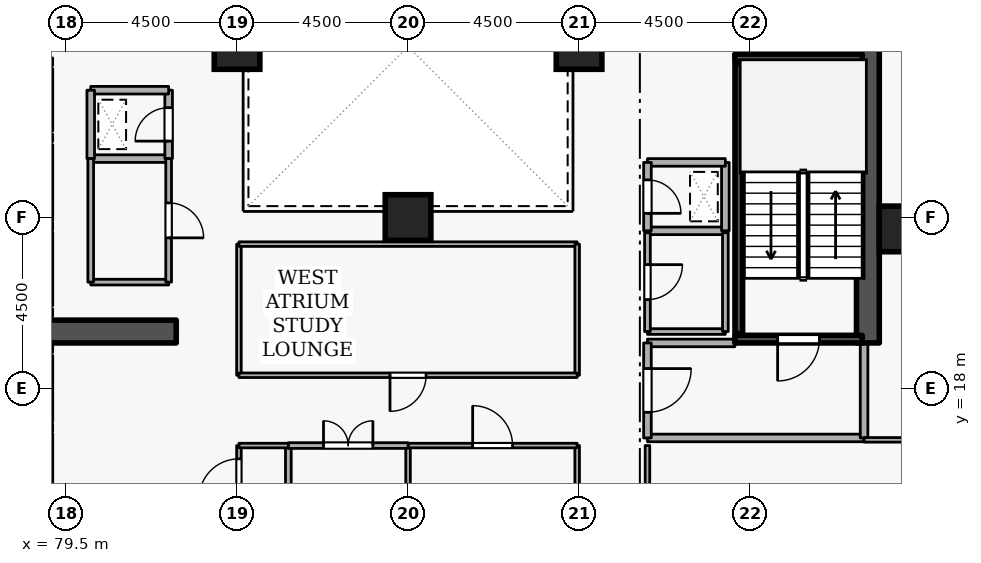
"""IFC4 building model, lengths in metres.
Left out: names, types, materials, properties, quantities, classifications, styles, units other than length and angle.
Written with IfcOpenShell. Run it as: python <this file> out.ifc"""

import sys

from ifc_helpers import new_model, si_unit, direction, frame, frame_2d, origin, origin_2d, place, context, subcontext, project, spatial, rectangle, extrude, element, fill, save


model = new_model("IFC4")
c1 = context("Model", 3, precision=1e-05, world=origin(), true_north=direction((0.0, 1.0)))
c2 = subcontext(c1, "Body", "Model", "MODEL_VIEW")
j1 = project(units=[si_unit("LENGTHUNIT", "METRE"), si_unit("PLANEANGLEUNIT", "RADIAN")], contexts=[c1])
p1 = place(None, origin())
s1 = spatial("IfcSite", under=j1, at=p1, CompositionType="ELEMENT")
p2 = place(p1, origin())
s2 = spatial("IfcBuilding", under=s1, at=p2, CompositionType="ELEMENT")
p3 = place(p2, frame((0.0, 0.0, 108.9)))
s3 = spatial("IfcBuildingStorey", under=s2, at=p3, CompositionType="ELEMENT", Elevation=108.9)
p4 = place(p3, frame((100.6, 19.2, 0.0), z_axis=(0.0, 0.0, 1.0), x_axis=(0.0, 1.0, 0.0)))
e1 = element("IfcWall", 1, at=p4, inside=s3, PredefinedType="SHEAR", context=c2, shape_type="SweptSolid", body=[
    extrude(rectangle(XDim=15.6, YDim=0.6, at=frame_2d((7.8, 0.0))), origin(), (0.0, 0.0, 1.0), 3.6),
])
p5 = place(p3, frame((76.7, 19.5, 0.0), z_axis=(0.0, 0.0, 1.0), x_axis=(1.0, 0.0, 0.0)))
e2 = element("IfcWall", 2, at=p5, inside=s3, PredefinedType="SHEAR", context=c2, shape_type="SweptSolid", body=[
    extrude(rectangle(XDim=5.7, YDim=0.6, at=frame_2d((2.85, 0.0))), origin(), (0.0, 0.0, 1.0), 3.6),
])
for number, where, z_axis, x_axis in (
    (3, (101.5, 22.2, 0.0), (0.0, 0.0, 1.0), (1.0, 0.0, 0.0)),
    (4, (93.0, 27.0, 0.0), (0.0, 0.0, 1.0), (1.0, 0.0, 0.0)),
    (5, (84.0, 27.0, 0.0), (0.0, 0.0, 1.0), (1.0, 0.0, 0.0)),
    (6, (88.5, 22.5, 0.0), (0.0, 0.0, 1.0), (1.0, 0.0, 0.0)),
):
    element("IfcColumn", number, at=place(p3, frame(where, z_axis=z_axis, x_axis=x_axis)), inside=s3, PredefinedType="COLUMN", context=c2, shape_type="SweptSolid", body=[
        extrude(rectangle(XDim=1.2, YDim=1.2, at=origin_2d()), origin(), (0.0, 0.0, 1.0), 3.6),
    ])
p6 = place(p3, frame((79.05, 24.78, 0.0), z_axis=(0.0, 0.0, 1.0), x_axis=(0.0, 1.0, 0.0)))
e7 = element("IfcWall", 7, at=p6, inside=s3, PredefinedType="STANDARD", context=c2, shape_type="SweptSolid", body=[
    extrude(rectangle(XDim=1.64, YDim=0.2, at=frame_2d((0.82, 0.0))), origin(), (0.0, 0.0, 1.0), 3.34),
])
p7 = place(p6, frame((0.31, 0.0, 0.0)))
e8 = element("IfcOpeningElement", 8, at=p7, cuts=e7, PredefinedType="OPENING", context=c2, shape_type="SweptSolid", body=[
    extrude(rectangle(XDim=1.02, YDim=2.06, at=frame_2d((0.51, 1.03))), frame((0.0, 0.11, 0.0), z_axis=(0.0, -1.0, 0.0), x_axis=(1.0, 0.0, 0.0)), (0.0, 0.0, 1.0), 0.22),
])
p8 = place(p3, frame((79.05, 22.43, 0.0), z_axis=(0.0, 0.0, 1.0), x_axis=(0.0, 1.0, 0.0)))
e9 = element("IfcWall", 9, at=p8, inside=s3, PredefinedType="STANDARD", context=c2, shape_type="SweptSolid", body=[
    extrude(rectangle(XDim=1.99, YDim=0.2, at=frame_2d((0.995, 0.0))), origin(), (0.0, 0.0, 1.0), 3.34),
])
p9 = place(p3, frame((79.05, 20.18, 0.0), z_axis=(0.0, 0.0, 1.0), x_axis=(0.0, 1.0, 0.0)))
e10 = element("IfcWall", 10, at=p9, inside=s3, PredefinedType="STANDARD", context=c2, shape_type="SweptSolid", body=[
    extrude(rectangle(XDim=1.94, YDim=0.2, at=frame_2d((0.97, 0.0))), origin(), (0.0, 0.0, 1.0), 3.34),
])
p10 = place(p3, frame((79.05, 17.13, 0.0), z_axis=(0.0, 0.0, 1.0), x_axis=(0.0, 1.0, 0.0)))
e11 = element("IfcWall", 11, at=p10, inside=s3, PredefinedType="STANDARD", context=c2, shape_type="SweptSolid", body=[
    extrude(rectangle(XDim=1.74, YDim=0.2, at=frame_2d((0.87, 0.0))), origin(), (0.0, 0.0, 1.0), 3.34),
])
p11 = place(p10, frame((0.36, 0.0, 0.0)))
e12 = element("IfcOpeningElement", 12, at=p11, cuts=e11, PredefinedType="OPENING", context=c2, shape_type="SweptSolid", body=[
    extrude(rectangle(XDim=1.02, YDim=2.06, at=frame_2d((0.51, 1.03))), frame((0.0, 0.11, 0.0), z_axis=(0.0, -1.0, 0.0), x_axis=(1.0, 0.0, 0.0)), (0.0, 0.0, 1.0), 0.22),
])
p12 = place(p3, frame((79.05, 15.03, 0.0), z_axis=(0.0, 0.0, 1.0), x_axis=(0.0, 1.0, 0.0)))
e13 = element("IfcWall", 13, at=p12, inside=s3, PredefinedType="STANDARD", context=c2, shape_type="SweptSolid", body=[
    extrude(rectangle(XDim=1.79, YDim=0.2, at=frame_2d((0.895, 0.0))), origin(), (0.0, 0.0, 1.0), 3.34),
])
p13 = place(p12, frame((0.385, 0.0, 0.0)))
e14 = element("IfcOpeningElement", 14, at=p13, cuts=e13, PredefinedType="OPENING", context=c2, shape_type="SweptSolid", body=[
    extrude(rectangle(XDim=1.02, YDim=2.06, at=frame_2d((0.51, 1.03))), frame((0.0, 0.11, 0.0), z_axis=(0.0, -1.0, 0.0), x_axis=(1.0, 0.0, 0.0)), (0.0, 0.0, 1.0), 0.22),
])
p14 = place(p3, frame((100.45, 19.3, 0.0), z_axis=(0.0, 0.0, 1.0), x_axis=(-1.0, 0.0, 0.0)))
e15 = element("IfcWall", 15, at=p14, inside=s3, PredefinedType="SHEAR", context=c2, shape_type="SweptSolid", body=[
    extrude(rectangle(XDim=3.35, YDim=0.2, at=frame_2d((1.675, 0.0))), origin(), (0.0, 0.0, 1.0), 3.6),
])
p15 = place(p14, frame((1.125, 0.0, 0.0)))
e16 = element("IfcOpeningElement", 16, at=p15, cuts=e15, PredefinedType="OPENING", context=c2, shape_type="SweptSolid", body=[
    extrude(rectangle(XDim=1.1, YDim=2.1, at=frame_2d((0.55, 1.05))), frame((0.0, 0.11, 0.0), z_axis=(0.0, -1.0, 0.0), x_axis=(1.0, 0.0, 0.0)), (0.0, 0.0, 1.0), 0.22),
])
p16 = place(p3, frame((97.1, 26.7, 0.0), z_axis=(0.0, 0.0, 1.0), x_axis=(1.0, 0.0, 0.0)))
e17 = element("IfcWall", 17, at=p16, inside=s3, PredefinedType="SHEAR", context=c2, shape_type="SweptSolid", body=[
    extrude(rectangle(XDim=3.35, YDim=0.2, at=frame_2d((1.675, 0.0))), origin(), (0.0, 0.0, 1.0), 3.6),
])
p17 = place(p3, frame((97.203, 26.55, 0.0), z_axis=(0.0, 0.0, 1.0), x_axis=(0.0, -1.0, 0.0)))
e18 = element("IfcWall", 18, at=p17, inside=s3, PredefinedType="SHEAR", context=c2, shape_type="SweptSolid", body=[
    extrude(rectangle(XDim=7.1, YDim=0.2, at=frame_2d((3.55, 0.0))), origin(), (0.0, 0.0, 1.0), 3.6),
])
p18 = place(p3, frame((94.8, 16.7, 0.0), z_axis=(0.0, 0.0, 1.0), x_axis=(1.0, 0.0, 0.0)))
e19 = element("IfcWall", 19, at=p18, inside=s3, PredefinedType="STANDARD", context=c2, shape_type="SweptSolid", body=[
    extrude(rectangle(XDim=5.7, YDim=0.2, at=frame_2d((2.85, 0.0))), origin(), (0.0, 0.0, 1.0), 3.34),
])
p19 = place(p3, frame((100.5, 16.7, 0.0), z_axis=(0.0, 0.0, 1.0), x_axis=(0.0, 1.0, 0.0)))
e20 = element("IfcWall", 20, at=p19, inside=s3, PredefinedType="STANDARD", context=c2, shape_type="SweptSolid", body=[
    extrude(rectangle(XDim=2.5, YDim=0.2, at=frame_2d((1.25, 0.0))), origin(), (0.0, 0.0, 1.0), 3.34),
])
p20 = place(p3, frame((97.1, 19.2, 0.0), z_axis=(0.0, 0.0, 1.0), x_axis=(-1.0, 0.0, 0.0)))
e21 = element("IfcWall", 21, at=p20, inside=s3, PredefinedType="STANDARD", context=c2, shape_type="SweptSolid", body=[
    extrude(rectangle(XDim=2.3, YDim=0.2, at=frame_2d((1.15, 0.0))), origin(), (0.0, 0.0, 1.0), 2.545),
])
p21 = place(p3, frame((94.8, 19.2, 0.0), z_axis=(0.0, 0.0, 1.0), x_axis=(0.0, -1.0, 0.0)))
e22 = element("IfcWall", 22, at=p21, inside=s3, PredefinedType="STANDARD", context=c2, shape_type="SweptSolid", body=[
    extrude(rectangle(XDim=2.5, YDim=0.2, at=frame_2d((1.25, 0.0))), origin(), (0.0, 0.0, 1.0), 3.34),
])
p22 = place(p21, frame((0.675, 0.0, 0.0)))
e23 = element("IfcOpeningElement", 23, at=p22, cuts=e22, PredefinedType="OPENING", context=c2, shape_type="SweptSolid", body=[
    extrude(rectangle(XDim=1.15, YDim=2.1, at=frame_2d((0.575, 1.05))), frame((0.0, 0.11, 0.0), z_axis=(0.0, -1.0, 0.0), x_axis=(1.0, 0.0, 0.0)), (0.0, 0.0, 1.0), 0.22),
])
p23 = place(p3, frame((94.8, 22.15, 0.0), z_axis=(0.0, 0.0, 1.0), x_axis=(1.0, 0.0, 0.0)))
e24 = element("IfcWall", 24, at=p23, inside=s3, PredefinedType="STANDARD", context=c2, shape_type="SweptSolid", body=[
    extrude(rectangle(XDim=2.05, YDim=0.2, at=frame_2d((1.025, 0.0))), origin(), (0.0, 0.0, 1.0), 3.34),
])
p24 = place(p3, frame((96.85, 22.15, 0.0), z_axis=(0.0, 0.0, 1.0), x_axis=(0.0, 1.0, 0.0)))
e25 = element("IfcWall", 25, at=p24, inside=s3, PredefinedType="STANDARD", context=c2, shape_type="SweptSolid", body=[
    extrude(rectangle(XDim=1.8, YDim=0.2, at=frame_2d((0.9, 0.0))), origin(), (0.0, 0.0, 1.0), 3.34),
])
p25 = place(p3, frame((96.85, 23.95, 0.0), z_axis=(0.0, 0.0, 1.0), x_axis=(-1.0, 0.0, 0.0)))
e26 = element("IfcWall", 26, at=p25, inside=s3, PredefinedType="STANDARD", context=c2, shape_type="SweptSolid", body=[
    extrude(rectangle(XDim=2.05, YDim=0.2, at=frame_2d((1.025, 0.0))), origin(), (0.0, 0.0, 1.0), 3.34),
])
p26 = place(p3, frame((94.8, 23.95, 0.0), z_axis=(0.0, 0.0, 1.0), x_axis=(0.0, -1.0, 0.0)))
e27 = element("IfcWall", 27, at=p26, inside=s3, PredefinedType="STANDARD", context=c2, shape_type="SweptSolid", body=[
    extrude(rectangle(XDim=1.8, YDim=0.2, at=frame_2d((0.9, 0.0))), origin(), (0.0, 0.0, 1.0), 3.34),
])
p27 = place(p26, frame((0.46, 0.0, 0.0)))
e28 = element("IfcOpeningElement", 28, at=p27, cuts=e27, PredefinedType="OPENING", context=c2, shape_type="SweptSolid", body=[
    extrude(rectangle(XDim=0.88, YDim=2.04, at=frame_2d((0.44, 1.02))), frame((0.0, 0.11, 0.0), z_axis=(0.0, -1.0, 0.0), x_axis=(1.0, 0.0, 0.0)), (0.0, 0.0, 1.0), 0.22),
])
p28 = place(p3, frame((80.15, 24.05, 0.0), z_axis=(0.0, 0.0, 1.0), x_axis=(1.0, 0.0, 0.0)))
e29 = element("IfcWall", 29, at=p28, inside=s3, PredefinedType="STANDARD", context=c2, shape_type="SweptSolid", body=[
    extrude(rectangle(XDim=2.05, YDim=0.2, at=frame_2d((1.025, 0.0))), origin(), (0.0, 0.0, 1.0), 3.34),
])
p29 = place(p3, frame((82.2, 24.05, 0.0), z_axis=(0.0, 0.0, 1.0), x_axis=(0.0, 1.0, 0.0)))
e30 = element("IfcWall", 30, at=p29, inside=s3, PredefinedType="STANDARD", context=c2, shape_type="SweptSolid", body=[
    extrude(rectangle(XDim=1.8, YDim=0.2, at=frame_2d((0.9, 0.0))), origin(), (0.0, 0.0, 1.0), 3.34),
])
p30 = place(p29, frame((0.46, 0.0, 0.0)))
e31 = element("IfcOpeningElement", 31, at=p30, cuts=e30, PredefinedType="OPENING", context=c2, shape_type="SweptSolid", body=[
    extrude(rectangle(XDim=0.88, YDim=2.04, at=frame_2d((0.44, 1.02))), frame((0.0, 0.11, 0.0), z_axis=(0.0, -1.0, 0.0), x_axis=(1.0, 0.0, 0.0)), (0.0, 0.0, 1.0), 0.22),
])
p31 = place(p3, frame((82.2, 25.85, 0.0), z_axis=(0.0, 0.0, 1.0), x_axis=(-1.0, 0.0, 0.0)))
e32 = element("IfcWall", 32, at=p31, inside=s3, PredefinedType="STANDARD", context=c2, shape_type="SweptSolid", body=[
    extrude(rectangle(XDim=2.05, YDim=0.2, at=frame_2d((1.025, 0.0))), origin(), (0.0, 0.0, 1.0), 3.34),
])
p32 = place(p3, frame((80.15, 25.85, 0.0), z_axis=(0.0, 0.0, 1.0), x_axis=(0.0, -1.0, 0.0)))
e33 = element("IfcWall", 33, at=p32, inside=s3, PredefinedType="STANDARD", context=c2, shape_type="SweptSolid", body=[
    extrude(rectangle(XDim=1.8, YDim=0.2, at=frame_2d((0.9, 0.0))), origin(), (0.0, 0.0, 1.0), 3.34),
])
p33 = place(p3, frame((94.8, 19.5, 0.0), z_axis=(0.0, 0.0, 1.0), x_axis=(1.0, 0.0, 0.0)))
e34 = element("IfcWall", 34, at=p33, inside=s3, PredefinedType="PARTITIONING", context=c2, shape_type="SweptSolid", body=[
    extrude(rectangle(XDim=2.05, YDim=0.15, at=frame_2d((1.025, 0.0))), origin(), (0.0, 0.0, 1.0), 2.545),
])
p34 = place(p3, frame((96.85, 19.5, 0.0), z_axis=(0.0, 0.0, 1.0), x_axis=(0.0, 1.0, 0.0)))
e35 = element("IfcWall", 35, at=p34, inside=s3, PredefinedType="PARTITIONING", context=c2, shape_type="SweptSolid", body=[
    extrude(rectangle(XDim=2.6, YDim=0.15, at=frame_2d((1.3, 0.0))), origin(), (0.0, 0.0, 1.0), 3.34),
])
p35 = place(p3, frame((94.8, 22.1, 0.0), z_axis=(0.0, 0.0, 1.0), x_axis=(0.0, -1.0, 0.0)))
e36 = element("IfcWall", 36, at=p35, inside=s3, PredefinedType="PARTITIONING", context=c2, shape_type="SweptSolid", body=[
    extrude(rectangle(XDim=2.6, YDim=0.15, at=frame_2d((1.3, 0.0))), origin(), (0.0, 0.0, 1.0), 3.34),
])
p36 = place(p35, frame((0.84, 0.0, 0.0)))
e37 = element("IfcOpeningElement", 37, at=p36, cuts=e36, PredefinedType="OPENING", context=c2, shape_type="SweptSolid", body=[
    extrude(rectangle(XDim=0.92, YDim=2.08, at=frame_2d((0.46, 1.04))), frame((0.0, 0.085, 0.0), z_axis=(0.0, -1.0, 0.0), x_axis=(1.0, 0.0, 0.0)), (0.0, 0.0, 1.0), 0.17),
])
p37 = place(p3, frame((82.2, 20.8, 0.0), z_axis=(0.0, 0.0, 1.0), x_axis=(-1.0, 0.0, 0.0)))
e38 = element("IfcWall", 38, at=p37, inside=s3, PredefinedType="PARTITIONING", context=c2, shape_type="SweptSolid", body=[
    extrude(rectangle(XDim=2.05, YDim=0.15, at=frame_2d((1.025, 0.0))), origin(), (0.0, 0.0, 1.0), 3.34),
])
p38 = place(p3, frame((80.15, 20.8, 0.0), z_axis=(0.0, 0.0, 1.0), x_axis=(0.0, 1.0, 0.0)))
e39 = element("IfcWall", 39, at=p38, inside=s3, PredefinedType="PARTITIONING", context=c2, shape_type="SweptSolid", body=[
    extrude(rectangle(XDim=3.25, YDim=0.15, at=frame_2d((1.625, 0.0))), origin(), (0.0, 0.0, 1.0), 3.34),
])
p39 = place(p3, frame((82.2, 24.05, 0.0), z_axis=(0.0, 0.0, 1.0), x_axis=(0.0, -1.0, 0.0)))
e40 = element("IfcWall", 40, at=p39, inside=s3, PredefinedType="PARTITIONING", context=c2, shape_type="SweptSolid", body=[
    extrude(rectangle(XDim=3.25, YDim=0.15, at=frame_2d((1.625, 0.0))), origin(), (0.0, 0.0, 1.0), 3.34),
])
p40 = place(p39, frame((1.165, 0.0, 0.0)))
e41 = element("IfcOpeningElement", 41, at=p40, cuts=e40, PredefinedType="OPENING", context=c2, shape_type="SweptSolid", body=[
    extrude(rectangle(XDim=0.92, YDim=2.08, at=frame_2d((0.46, 1.04))), frame((0.0, 0.085, 0.0), z_axis=(0.0, -1.0, 0.0), x_axis=(1.0, 0.0, 0.0)), (0.0, 0.0, 1.0), 0.17),
])
for number, where, z_axis, x_axis in (
    (42, (92.95, 16.5, 0.0), (0.0, 0.0, 1.0), (0.0, -1.0, 0.0)),
    (43, (94.8, 14.75, 0.0), (0.0, 0.0, 1.0), (0.0, 1.0, 0.0)),
):
    element("IfcWall", number, at=place(p3, frame(where, z_axis=z_axis, x_axis=x_axis)), inside=s3, PredefinedType="PARTITIONING", context=c2, shape_type="SweptSolid", body=[
        extrude(rectangle(XDim=1.75, YDim=0.12, at=frame_2d((0.875, 0.0))), origin(), (0.0, 0.0, 1.0), 3.34),
    ])
p41 = place(p3, frame((100.5, 16.65, 0.0), z_axis=(0.0, 0.0, 1.0), x_axis=(1.0, 0.0, 0.0)))
e44 = element("IfcWall", 44, at=p41, inside=s3, PredefinedType="PARTITIONING", context=c2, shape_type="SweptSolid", body=[
    extrude(rectangle(XDim=5.92, YDim=0.12, at=frame_2d((2.96, 0.0))), origin(), (0.0, 0.0, 1.0), 3.34),
])
p42 = place(p3, frame((88.5, 3.08, 0.0), z_axis=(0.0, 0.0, 1.0), x_axis=(0.0, 1.0, 0.0)))
e45 = element("IfcWall", 45, at=p42, inside=s3, PredefinedType="PARTITIONING", context=c2, shape_type="SweptSolid", body=[
    extrude(rectangle(XDim=13.42, YDim=0.12, at=frame_2d((6.71, 0.0))), origin(), (0.0, 0.0, 1.0), 2.882),
])
p43 = place(p3, frame((88.5, 16.5, 0.0), z_axis=(0.0, 0.0, 1.0), x_axis=(1.0, 0.0, 0.0)))
e46 = element("IfcWall", 46, at=p43, inside=s3, PredefinedType="PARTITIONING", context=c2, shape_type="SweptSolid", body=[
    extrude(rectangle(XDim=4.45, YDim=0.12, at=frame_2d((2.225, 0.0))), origin(), (0.0, 0.0, 1.0), 3.34),
])
p44 = place(p43, frame((1.7, 0.0, 0.0)))
e47 = element("IfcOpeningElement", 47, at=p44, cuts=e46, PredefinedType="OPENING", context=c2, shape_type="SweptSolid", body=[
    extrude(rectangle(XDim=1.05, YDim=2.1, at=frame_2d((0.525, 1.05))), frame((0.0, 0.07, 0.0), z_axis=(0.0, -1.0, 0.0), x_axis=(1.0, 0.0, 0.0)), (0.0, 0.0, 1.0), 0.14),
])
p45 = place(p3, frame((85.35, 3.08, 0.0), z_axis=(0.0, 0.0, 1.0), x_axis=(0.0, 1.0, 0.0)))
e48 = element("IfcWall", 48, at=p45, inside=s3, PredefinedType="PARTITIONING", context=c2, shape_type="SweptSolid", body=[
    extrude(rectangle(XDim=13.42, YDim=0.15, at=frame_2d((6.71, 0.0))), origin(), (0.0, 0.0, 1.0), 3.34),
])
p46 = place(p3, frame((85.35, 16.5, 0.0), z_axis=(0.0, 0.0, 1.0), x_axis=(1.0, 0.0, 0.0)))
e49 = element("IfcWall", 49, at=p46, inside=s3, PredefinedType="PARTITIONING", context=c2, shape_type="SweptSolid", body=[
    extrude(rectangle(XDim=3.15, YDim=0.15, at=frame_2d((1.575, 0.0))), origin(), (0.0, 0.0, 1.0), 3.34),
])
p47 = place(p46, frame((0.925, 0.0, 0.0)))
e50 = element("IfcOpeningElement", 50, at=p47, cuts=e49, PredefinedType="OPENING", context=c2, shape_type="SweptSolid", body=[
    extrude(rectangle(XDim=1.3, YDim=2.12, at=frame_2d((0.65, 1.06))), frame((0.0, 0.085, 0.0), z_axis=(0.0, -1.0, 0.0), x_axis=(1.0, 0.0, 0.0)), (0.0, 0.0, 1.0), 0.17),
])
p48 = place(p3, frame((84.05, 14.75, 0.0), z_axis=(0.0, 0.0, 1.0), x_axis=(0.0, 1.0, 0.0)))
e51 = element("IfcWall", 51, at=p48, inside=s3, PredefinedType="PARTITIONING", context=c2, shape_type="SweptSolid", body=[
    extrude(rectangle(XDim=1.75, YDim=0.12, at=frame_2d((0.875, 0.0))), origin(), (0.0, 0.0, 1.0), 3.34),
])
p49 = place(p48, frame((0.35, 0.0, 0.0)))
e52 = element("IfcOpeningElement", 52, at=p49, cuts=e51, PredefinedType="OPENING", context=c2, shape_type="SweptSolid", body=[
    extrude(rectangle(XDim=1.05, YDim=2.1, at=frame_2d((0.525, 1.05))), frame((0.0, 0.07, 0.0), z_axis=(0.0, -1.0, 0.0), x_axis=(1.0, 0.0, 0.0)), (0.0, 0.0, 1.0), 0.14),
])
p50 = place(p3, frame((84.05, 16.5, 0.0), z_axis=(0.0, 0.0, 1.0), x_axis=(1.0, 0.0, 0.0)))
e53 = element("IfcWall", 53, at=p50, inside=s3, PredefinedType="PARTITIONING", context=c2, shape_type="SweptSolid", body=[
    extrude(rectangle(XDim=1.3, YDim=0.12, at=frame_2d((0.65, 0.0))), origin(), (0.0, 0.0, 1.0), 3.34),
])
p51 = place(p3, frame((84.05, 18.35, 0.0), z_axis=(0.0, 0.0, 1.0), x_axis=(0.0, 1.0, 0.0)))
e54 = element("IfcWall", 54, at=p51, inside=s3, PredefinedType="PARTITIONING", context=c2, shape_type="SweptSolid", body=[
    extrude(rectangle(XDim=3.45, YDim=0.12, at=frame_2d((1.725, 0.0))), origin(), (0.0, 0.0, 1.0), 3.34),
])
p52 = place(p3, frame((84.05, 21.8, 0.0), z_axis=(0.0, 0.0, 1.0), x_axis=(1.0, 0.0, 0.0)))
e55 = element("IfcWall", 55, at=p52, inside=s3, PredefinedType="PARTITIONING", context=c2, shape_type="SweptSolid", body=[
    extrude(rectangle(XDim=8.9, YDim=0.12, at=frame_2d((4.45, 0.0))), origin(), (0.0, 0.0, 1.0), 3.34),
])
p53 = place(p3, frame((92.95, 21.8, 0.0), z_axis=(0.0, 0.0, 1.0), x_axis=(0.0, -1.0, 0.0)))
e56 = element("IfcWall", 56, at=p53, inside=s3, PredefinedType="PARTITIONING", context=c2, shape_type="SweptSolid", body=[
    extrude(rectangle(XDim=3.45, YDim=0.12, at=frame_2d((1.725, 0.0))), origin(), (0.0, 0.0, 1.0), 3.34),
])
p54 = place(p3, frame((92.95, 18.35, 0.0), z_axis=(0.0, 0.0, 1.0), x_axis=(-1.0, 0.0, 0.0)))
e57 = element("IfcWall", 57, at=p54, inside=s3, PredefinedType="PARTITIONING", context=c2, shape_type="SweptSolid", body=[
    extrude(rectangle(XDim=8.9, YDim=0.12, at=frame_2d((4.45, 0.0))), origin(), (0.0, 0.0, 1.0), 3.34),
])
p55 = place(p54, frame((3.975, 0.0, 0.0)))
e58 = element("IfcOpeningElement", 58, at=p55, cuts=e57, PredefinedType="OPENING", context=c2, shape_type="SweptSolid", body=[
    extrude(rectangle(XDim=0.95, YDim=2.1, at=frame_2d((0.475, 1.05))), frame((0.0, 0.07, 0.0), z_axis=(0.0, -1.0, 0.0), x_axis=(1.0, 0.0, 0.0)), (0.0, 0.0, 1.0), 0.14),
])
p56 = place(p15, origin())
e59 = element("IfcDoor", 59, at=p56, inside=s3, OperationType="SINGLE_SWING_RIGHT", PredefinedType="DOOR", context=c2, shape_type="SweptSolid", body=[
    extrude(rectangle(XDim=1.1, YDim=2.1, at=frame_2d((0.55, 1.05))), frame((0.0, 0.025, 0.0), z_axis=(0.0, -1.0, 0.0), x_axis=(1.0, 0.0, 0.0)), (0.0, 0.0, 1.0), 0.05),
])
fill(e16, e59)
p57 = place(p22, origin())
e60 = element("IfcDoor", 60, at=p57, inside=s3, OperationType="SINGLE_SWING_LEFT", PredefinedType="DOOR", context=c2, shape_type="SweptSolid", body=[
    extrude(rectangle(XDim=1.15, YDim=2.1, at=frame_2d((0.575, 1.05))), frame((0.0, 0.025, 0.0), z_axis=(0.0, -1.0, 0.0), x_axis=(1.0, 0.0, 0.0)), (0.0, 0.0, 1.0), 0.05),
])
fill(e23, e60)
p58 = place(p27, origin())
e61 = element("IfcDoor", 61, at=p58, inside=s3, OperationType="SINGLE_SWING_RIGHT", PredefinedType="DOOR", context=c2, shape_type="SweptSolid", body=[
    extrude(rectangle(XDim=0.88, YDim=2.04, at=frame_2d((0.44, 1.02))), frame((0.0, 0.025, 0.0), z_axis=(0.0, -1.0, 0.0), x_axis=(1.0, 0.0, 0.0)), (0.0, 0.0, 1.0), 0.05),
])
fill(e28, e61)
p59 = place(p30, origin())
e62 = element("IfcDoor", 62, at=p59, inside=s3, OperationType="SINGLE_SWING_LEFT", PredefinedType="DOOR", context=c2, shape_type="SweptSolid", body=[
    extrude(rectangle(XDim=0.88, YDim=2.04, at=frame_2d((0.44, 1.02))), frame((0.0, 0.025, 0.0), z_axis=(0.0, -1.0, 0.0), x_axis=(1.0, 0.0, 0.0)), (0.0, 0.0, 1.0), 0.05),
])
fill(e31, e62)
p60 = place(p36, origin())
e63 = element("IfcDoor", 63, at=p60, inside=s3, OperationType="SINGLE_SWING_LEFT", PredefinedType="DOOR", context=c2, shape_type="SweptSolid", body=[
    extrude(rectangle(XDim=0.92, YDim=2.08, at=frame_2d((0.46, 1.04))), frame((0.0, 0.025, 0.0), z_axis=(0.0, -1.0, 0.0), x_axis=(1.0, 0.0, 0.0)), (0.0, 0.0, 1.0), 0.05),
])
fill(e37, e63)
p61 = place(p40, origin())
e64 = element("IfcDoor", 64, at=p61, inside=s3, OperationType="SINGLE_SWING_RIGHT", PredefinedType="DOOR", context=c2, shape_type="SweptSolid", body=[
    extrude(rectangle(XDim=0.92, YDim=2.08, at=frame_2d((0.46, 1.04))), frame((0.0, 0.025, 0.0), z_axis=(0.0, -1.0, 0.0), x_axis=(1.0, 0.0, 0.0)), (0.0, 0.0, 1.0), 0.05),
])
fill(e41, e64)
p62 = place(p44, origin())
e65 = element("IfcDoor", 65, at=p62, inside=s3, OperationType="SINGLE_SWING_LEFT", PredefinedType="DOOR", context=c2, shape_type="SweptSolid", body=[
    extrude(rectangle(XDim=1.05, YDim=2.1, at=frame_2d((0.525, 1.05))), frame((0.0, 0.025, 0.0), z_axis=(0.0, -1.0, 0.0), x_axis=(1.0, 0.0, 0.0)), (0.0, 0.0, 1.0), 0.05),
])
fill(e47, e65)
p63 = place(p47, origin())
e66 = element("IfcDoor", 66, at=p63, inside=s3, OperationType="DOUBLE_DOOR_SINGLE_SWING", PredefinedType="DOOR", context=c2, shape_type="SweptSolid", body=[
    extrude(rectangle(XDim=1.3, YDim=2.12, at=frame_2d((0.65, 1.06))), frame((0.0, 0.025, 0.0), z_axis=(0.0, -1.0, 0.0), x_axis=(1.0, 0.0, 0.0)), (0.0, 0.0, 1.0), 0.05),
])
fill(e50, e66)
p64 = place(p49, origin())
e67 = element("IfcDoor", 67, at=p64, inside=s3, OperationType="SINGLE_SWING_LEFT", PredefinedType="DOOR", context=c2, shape_type="SweptSolid", body=[
    extrude(rectangle(XDim=1.05, YDim=2.1, at=frame_2d((0.525, 1.05))), frame((0.0, 0.025, 0.0), z_axis=(0.0, -1.0, 0.0), x_axis=(1.0, 0.0, 0.0)), (0.0, 0.0, 1.0), 0.05),
])
fill(e52, e67)
p65 = place(p55, origin())
e68 = element("IfcDoor", 68, at=p65, inside=s3, OperationType="SINGLE_SWING_RIGHT", PredefinedType="DOOR", context=c2, shape_type="SweptSolid", body=[
    extrude(rectangle(XDim=0.95, YDim=2.1, at=frame_2d((0.475, 1.05))), frame((0.0, 0.025, 0.0), z_axis=(0.0, -1.0, 0.0), x_axis=(1.0, 0.0, 0.0)), (0.0, 0.0, 1.0), 0.05),
])
fill(e58, e68)
save(model, sys.argv[1])
